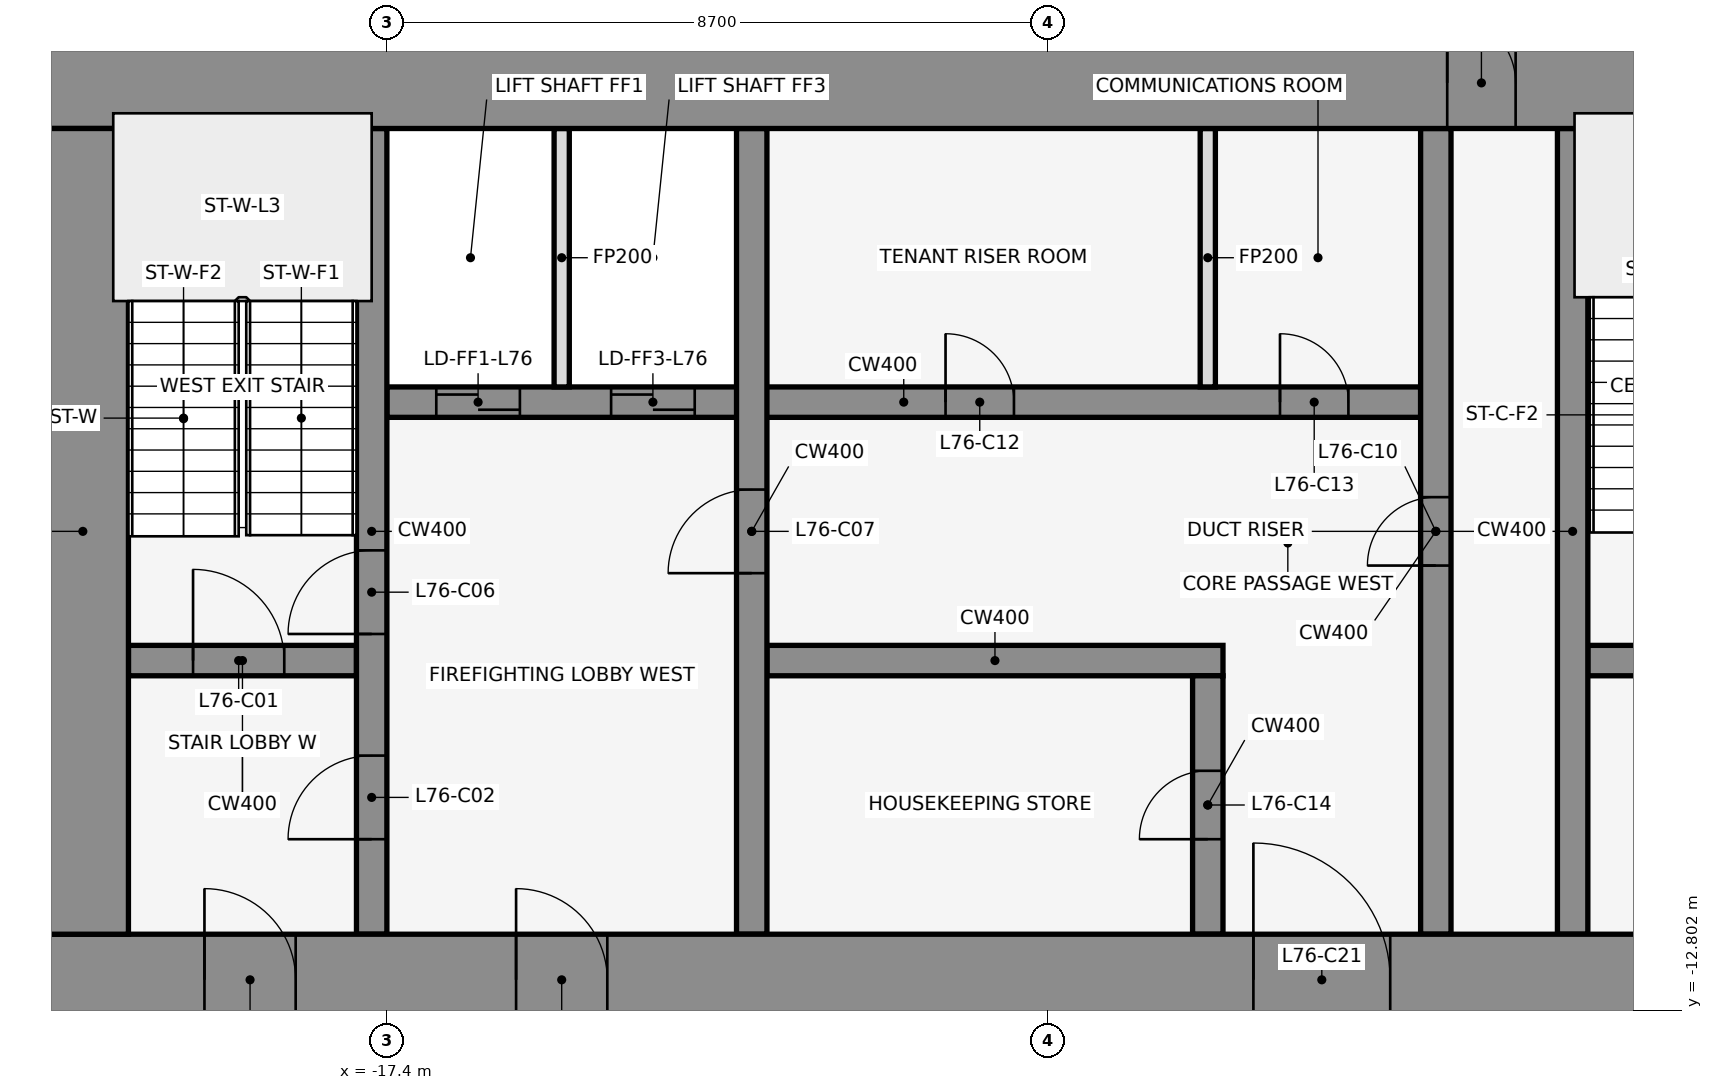
"""IFC4 building model, lengths in metres.
Left out: names, types, materials, properties, quantities, classifications, styles, units other than length and angle.
Written with IfcOpenShell. Run it as: python <this file> out.ifc"""

import sys

from ifc_helpers import new_model, si_unit, direction, frame, frame_2d, origin, place, context, subcontext, project, spatial, rectangle, extrude, element, fill, save


model = new_model("IFC4")
c1 = context("Model", 3, precision=1e-05, world=origin(), true_north=direction((0.0, 1.0)))
c2 = subcontext(c1, "Body", "Model", "MODEL_VIEW")
j1 = project(units=[si_unit("LENGTHUNIT", "METRE"), si_unit("PLANEANGLEUNIT", "RADIAN")], contexts=[c1])
p1 = place(None, origin())
s1 = spatial("IfcSite", under=j1, at=p1, CompositionType="ELEMENT")
p2 = place(p1, origin())
s2 = spatial("IfcBuilding", under=s1, at=p2, CompositionType="ELEMENT")
p3 = place(p2, frame((0.0, 0.0, 338.0)))
s3 = spatial("IfcBuildingStorey", under=s2, at=p3, CompositionType="ELEMENT", Elevation=338.0)
for number, where, z_axis, x_axis in (
    (1, (-0.068, -0.105, 0.0), (0.0, 0.0, 1.0), (-0.84, 0.543, 0.0)),
    (2, (-14.599, 1.08, 0.0), (0.0, 0.0, 1.0), (-0.84, -0.543, 0.0)),
):
    element("IfcWall", number, at=place(p3, frame(where, z_axis=z_axis, x_axis=x_axis)), inside=s3, PredefinedType="STANDARD", context=c2, shape_type="SweptSolid", body=[
        extrude(rectangle(XDim=2.183, YDim=0.25, at=frame_2d((1.091, 0.0))), origin(), (0.0, 0.0, 1.0), 4.3),
    ])
p4 = place(p3, frame((-20.8, -8.2, 0.0), z_axis=(0.0, 0.0, 1.0), x_axis=(1.0, 0.0, 0.0)))
e3 = element("IfcWall", 3, at=p4, inside=s3, PredefinedType="SHEAR", context=c2, shape_type="SweptSolid", body=[
    extrude(rectangle(XDim=3.0, YDim=0.4, at=frame_2d((1.5, 0.0))), origin(), (0.0, 0.0, 1.0), 4.5),
])
p5 = place(p4, frame((0.85, 0.0, 0.0)))
e4 = element("IfcOpeningElement", 4, at=p5, cuts=e3, PredefinedType="OPENING", context=c2, shape_type="SweptSolid", body=[
    extrude(rectangle(XDim=1.2, YDim=2.1, at=frame_2d((0.6, 1.05))), frame((0.0, 0.212, 0.0), z_axis=(0.0, -1.0, 0.0), x_axis=(1.0, 0.0, 0.0)), (0.0, 0.0, 1.0), 0.424),
])
p6 = place(p3, frame((-12.4, -8.2, 0.0), z_axis=(0.0, 0.0, 1.0), x_axis=(1.0, 0.0, 0.0)))
e5 = element("IfcWall", 5, at=p6, inside=s3, PredefinedType="SHEAR", context=c2, shape_type="SweptSolid", body=[
    extrude(rectangle(XDim=6.0, YDim=0.4, at=frame_2d((3.0, 0.0))), origin(), (0.0, 0.0, 1.0), 4.5),
])
p7 = place(p3, frame((-1.6, -8.2, 0.0), z_axis=(0.0, 0.0, 1.0), x_axis=(1.0, 0.0, 0.0)))
e6 = element("IfcWall", 6, at=p7, inside=s3, PredefinedType="SHEAR", context=c2, shape_type="SweptSolid", body=[
    extrude(rectangle(XDim=3.2, YDim=0.4, at=frame_2d((1.6, 0.0))), origin(), (0.0, 0.0, 1.0), 4.5),
])
p8 = place(p7, frame((1.05, 0.0, 0.0)))
e7 = element("IfcOpeningElement", 7, at=p8, cuts=e6, PredefinedType="OPENING", context=c2, shape_type="SweptSolid", body=[
    extrude(rectangle(XDim=1.2, YDim=2.1, at=frame_2d((0.6, 1.05))), frame((0.0, 0.212, 0.0), z_axis=(0.0, -1.0, 0.0), x_axis=(1.0, 0.0, 0.0)), (0.0, 0.0, 1.0), 0.424),
])
p9 = place(p3, frame((-17.4, -4.8, 0.0), z_axis=(0.0, 0.0, 1.0), x_axis=(1.0, 0.0, 0.0)))
e8 = element("IfcWall", 8, at=p9, inside=s3, PredefinedType="SHEAR", context=c2, shape_type="SweptSolid", body=[
    extrude(rectangle(XDim=13.6, YDim=0.4, at=frame_2d((6.8, 0.0))), origin(), (0.0, 0.0, 1.0), 4.5),
])
p10 = place(p9, frame((0.65, 0.0, 0.0)))
e9 = element("IfcOpeningElement", 9, at=p10, cuts=e8, PredefinedType="OPENING", context=c2, shape_type="SweptSolid", body=[
    extrude(rectangle(XDim=1.1, YDim=2.1, at=frame_2d((0.55, 1.05))), frame((0.0, 0.212, 0.0), z_axis=(0.0, -1.0, 0.0), x_axis=(1.0, 0.0, 0.0)), (0.0, 0.0, 1.0), 0.424),
])
p11 = place(p9, frame((2.95, 0.0, 0.0)))
e10 = element("IfcOpeningElement", 10, at=p11, cuts=e8, PredefinedType="OPENING", context=c2, shape_type="SweptSolid", body=[
    extrude(rectangle(XDim=1.1, YDim=2.1, at=frame_2d((0.55, 1.05))), frame((0.0, 0.212, 0.0), z_axis=(0.0, -1.0, 0.0), x_axis=(1.0, 0.0, 0.0)), (0.0, 0.0, 1.0), 0.424),
])
p12 = place(p9, frame((7.35, 0.0, 0.0)))
e11 = element("IfcOpeningElement", 11, at=p12, cuts=e8, PredefinedType="OPENING", context=c2, shape_type="SweptSolid", body=[
    extrude(rectangle(XDim=0.9, YDim=2.1, at=frame_2d((0.45, 1.05))), frame((0.0, 0.212, 0.0), z_axis=(0.0, -1.0, 0.0), x_axis=(1.0, 0.0, 0.0)), (0.0, 0.0, 1.0), 0.424),
])
p13 = place(p9, frame((11.75, 0.0, 0.0)))
e12 = element("IfcOpeningElement", 12, at=p13, cuts=e8, PredefinedType="OPENING", context=c2, shape_type="SweptSolid", body=[
    extrude(rectangle(XDim=0.9, YDim=2.1, at=frame_2d((0.45, 1.05))), frame((0.0, 0.212, 0.0), z_axis=(0.0, -1.0, 0.0), x_axis=(1.0, 0.0, 0.0)), (0.0, 0.0, 1.0), 0.424),
])
p14 = place(p3, frame((-17.6, -11.8, 0.0), z_axis=(0.0, 0.0, 1.0), x_axis=(0.0, 1.0, 0.0)))
e13 = element("IfcWall", 13, at=p14, inside=s3, PredefinedType="SHEAR", context=c2, shape_type="SweptSolid", body=[
    extrude(rectangle(XDim=10.6, YDim=0.4, at=frame_2d((5.3, 0.0))), origin(), (0.0, 0.0, 1.0), 4.5),
])
p15 = place(p14, frame((1.25, 0.0, 0.0)))
e14 = element("IfcOpeningElement", 14, at=p15, cuts=e13, PredefinedType="OPENING", context=c2, shape_type="SweptSolid", body=[
    extrude(rectangle(XDim=1.1, YDim=2.1, at=frame_2d((0.55, 1.05))), frame((0.0, 0.212, 0.0), z_axis=(0.0, -1.0, 0.0), x_axis=(1.0, 0.0, 0.0)), (0.0, 0.0, 1.0), 0.424),
])
p16 = place(p14, frame((3.95, 0.0, 0.0)))
e15 = element("IfcOpeningElement", 15, at=p16, cuts=e13, PredefinedType="OPENING", context=c2, shape_type="SweptSolid", body=[
    extrude(rectangle(XDim=1.1, YDim=2.1, at=frame_2d((0.55, 1.05))), frame((0.0, 0.212, 0.0), z_axis=(0.0, -1.0, 0.0), x_axis=(1.0, 0.0, 0.0)), (0.0, 0.0, 1.0), 0.424),
])
p17 = place(p3, frame((-15.1, -4.6, 0.0), z_axis=(0.0, 0.0, 1.0), x_axis=(0.0, 1.0, 0.0)))
e16 = element("IfcWall", 16, at=p17, inside=s3, PredefinedType="PARTITIONING", context=c2, shape_type="SweptSolid", body=[
    extrude(rectangle(XDim=3.4, YDim=0.2, at=frame_2d((1.7, 0.0))), origin(), (0.0, 0.0, 1.0), 3.368),
])
p18 = place(p3, frame((-12.6, -11.8, 0.0), z_axis=(0.0, 0.0, 1.0), x_axis=(0.0, 1.0, 0.0)))
e17 = element("IfcWall", 17, at=p18, inside=s3, PredefinedType="SHEAR", context=c2, shape_type="SweptSolid", body=[
    extrude(rectangle(XDim=10.6, YDim=0.4, at=frame_2d((5.3, 0.0))), origin(), (0.0, 0.0, 1.0), 4.5),
])
p19 = place(p18, frame((4.75, 0.0, 0.0)))
e18 = element("IfcOpeningElement", 18, at=p19, cuts=e17, PredefinedType="OPENING", context=c2, shape_type="SweptSolid", body=[
    extrude(rectangle(XDim=1.1, YDim=2.1, at=frame_2d((0.55, 1.05))), frame((0.0, 0.212, 0.0), z_axis=(0.0, -1.0, 0.0), x_axis=(1.0, 0.0, 0.0)), (0.0, 0.0, 1.0), 0.424),
])
p20 = place(p3, frame((-6.6, -11.8, 0.0), z_axis=(0.0, 0.0, 1.0), x_axis=(0.0, 1.0, 0.0)))
e19 = element("IfcWall", 19, at=p20, inside=s3, PredefinedType="SHEAR", context=c2, shape_type="SweptSolid", body=[
    extrude(rectangle(XDim=3.4, YDim=0.4, at=frame_2d((1.7, 0.0))), origin(), (0.0, 0.0, 1.0), 4.5),
])
p21 = place(p20, frame((1.25, 0.0, 0.0)))
e20 = element("IfcOpeningElement", 20, at=p21, cuts=e19, PredefinedType="OPENING", context=c2, shape_type="SweptSolid", body=[
    extrude(rectangle(XDim=0.9, YDim=2.1, at=frame_2d((0.45, 1.05))), frame((0.0, 0.212, 0.0), z_axis=(0.0, -1.0, 0.0), x_axis=(1.0, 0.0, 0.0)), (0.0, 0.0, 1.0), 0.424),
])
p22 = place(p3, frame((-6.6, -4.6, 0.0), z_axis=(0.0, 0.0, 1.0), x_axis=(0.0, 1.0, 0.0)))
e21 = element("IfcWall", 21, at=p22, inside=s3, PredefinedType="PARTITIONING", context=c2, shape_type="SweptSolid", body=[
    extrude(rectangle(XDim=3.4, YDim=0.2, at=frame_2d((1.7, 0.0))), origin(), (0.0, 0.0, 1.0), 3.368),
])
p23 = place(p3, frame((-3.6, -11.8, 0.0), z_axis=(0.0, 0.0, 1.0), x_axis=(0.0, 1.0, 0.0)))
e22 = element("IfcWall", 22, at=p23, inside=s3, PredefinedType="SHEAR", context=c2, shape_type="SweptSolid", body=[
    extrude(rectangle(XDim=10.6, YDim=0.4, at=frame_2d((5.3, 0.0))), origin(), (0.0, 0.0, 1.0), 4.5),
])
p24 = place(p23, frame((4.85, 0.0, 0.0)))
e23 = element("IfcOpeningElement", 23, at=p24, cuts=e22, PredefinedType="OPENING", context=c2, shape_type="SweptSolid", body=[
    extrude(rectangle(XDim=0.9, YDim=2.1, at=frame_2d((0.45, 1.05))), frame((0.0, 0.212, 0.0), z_axis=(0.0, -1.0, 0.0), x_axis=(1.0, 0.0, 0.0)), (0.0, 0.0, 1.0), 0.424),
])
p25 = place(p3, frame((-1.8, -11.8, 0.0), z_axis=(0.0, 0.0, 1.0), x_axis=(0.0, 1.0, 0.0)))
e24 = element("IfcWall", 24, at=p25, inside=s3, PredefinedType="SHEAR", context=c2, shape_type="SweptSolid", body=[
    extrude(rectangle(XDim=10.6, YDim=0.4, at=frame_2d((5.3, 0.0))), origin(), (0.0, 0.0, 1.0), 4.5),
])
p26 = place(p3, frame((-22.0, -0.6, 0.0), z_axis=(0.0, 0.0, 1.0), x_axis=(1.0, 0.0, 0.0)))
e25 = element("IfcWall", 25, at=p26, inside=s3, PredefinedType="SHEAR", context=c2, shape_type="SweptSolid", body=[
    extrude(rectangle(XDim=44.0, YDim=1.2, at=frame_2d((22.0, 0.0))), origin(), (0.0, 0.0, 1.0), 4.5),
])
p27 = place(p26, frame((18.55, 0.0, 0.0)))
e26 = element("IfcOpeningElement", 26, at=p27, cuts=e25, PredefinedType="OPENING", context=c2, shape_type="SweptSolid", body=[
    extrude(rectangle(XDim=0.9, YDim=2.1, at=frame_2d((0.45, 1.05))), frame((0.0, 0.612, 0.0), z_axis=(0.0, -1.0, 0.0), x_axis=(1.0, 0.0, 0.0)), (0.0, 0.0, 1.0), 1.224),
])
p28 = place(p26, frame((24.55, 0.0, 0.0)))
e27 = element("IfcOpeningElement", 27, at=p28, cuts=e25, PredefinedType="OPENING", context=c2, shape_type="SweptSolid", body=[
    extrude(rectangle(XDim=0.9, YDim=2.1, at=frame_2d((0.45, 1.05))), frame((0.0, 0.612, 0.0), z_axis=(0.0, -1.0, 0.0), x_axis=(1.0, 0.0, 0.0)), (0.0, 0.0, 1.0), 1.224),
])
p29 = place(p3, frame((-22.0, -12.4, 0.0), z_axis=(0.0, 0.0, 1.0), x_axis=(1.0, 0.0, 0.0)))
e28 = element("IfcWall", 28, at=p29, inside=s3, PredefinedType="SHEAR", context=c2, shape_type="SweptSolid", body=[
    extrude(rectangle(XDim=44.0, YDim=1.2, at=frame_2d((22.0, 0.0))), origin(), (0.0, 0.0, 1.0), 4.5),
])
p30 = place(p29, frame((2.2, 0.0, 0.0)))
e29 = element("IfcOpeningElement", 29, at=p30, cuts=e28, PredefinedType="OPENING", context=c2, shape_type="SweptSolid", body=[
    extrude(rectangle(XDim=1.2, YDim=2.1, at=frame_2d((0.6, 1.05))), frame((0.0, 0.612, 0.0), z_axis=(0.0, -1.0, 0.0), x_axis=(1.0, 0.0, 0.0)), (0.0, 0.0, 1.0), 1.224),
])
p31 = place(p29, frame((21.4, 0.0, 0.0)))
e30 = element("IfcOpeningElement", 30, at=p31, cuts=e28, PredefinedType="OPENING", context=c2, shape_type="SweptSolid", body=[
    extrude(rectangle(XDim=1.2, YDim=2.1, at=frame_2d((0.6, 1.05))), frame((0.0, 0.612, 0.0), z_axis=(0.0, -1.0, 0.0), x_axis=(1.0, 0.0, 0.0)), (0.0, 0.0, 1.0), 1.224),
])
p32 = place(p29, frame((40.6, 0.0, 0.0)))
e31 = element("IfcOpeningElement", 31, at=p32, cuts=e28, PredefinedType="OPENING", context=c2, shape_type="SweptSolid", body=[
    extrude(rectangle(XDim=1.2, YDim=2.1, at=frame_2d((0.6, 1.05))), frame((0.0, 0.612, 0.0), z_axis=(0.0, -1.0, 0.0), x_axis=(1.0, 0.0, 0.0)), (0.0, 0.0, 1.0), 1.224),
])
p33 = place(p29, frame((16.0, 0.0, 0.0)))
e32 = element("IfcOpeningElement", 32, at=p33, cuts=e28, PredefinedType="OPENING", context=c2, shape_type="SweptSolid", body=[
    extrude(rectangle(XDim=1.8, YDim=2.1, at=frame_2d((0.9, 1.05))), frame((0.0, 0.612, 0.0), z_axis=(0.0, -1.0, 0.0), x_axis=(1.0, 0.0, 0.0)), (0.0, 0.0, 1.0), 1.224),
])
p34 = place(p29, frame((6.3, 0.0, 0.0)))
e33 = element("IfcOpeningElement", 33, at=p34, cuts=e28, PredefinedType="OPENING", context=c2, shape_type="SweptSolid", body=[
    extrude(rectangle(XDim=1.2, YDim=2.1, at=frame_2d((0.6, 1.05))), frame((0.0, 0.612, 0.0), z_axis=(0.0, -1.0, 0.0), x_axis=(1.0, 0.0, 0.0)), (0.0, 0.0, 1.0), 1.224),
])
p35 = place(p29, frame((26.2, 0.0, 0.0)))
e34 = element("IfcOpeningElement", 34, at=p35, cuts=e28, PredefinedType="OPENING", context=c2, shape_type="SweptSolid", body=[
    extrude(rectangle(XDim=1.8, YDim=2.1, at=frame_2d((0.9, 1.05))), frame((0.0, 0.612, 0.0), z_axis=(0.0, -1.0, 0.0), x_axis=(1.0, 0.0, 0.0)), (0.0, 0.0, 1.0), 1.224),
])
p36 = place(p29, frame((36.5, 0.0, 0.0)))
e35 = element("IfcOpeningElement", 35, at=p36, cuts=e28, PredefinedType="OPENING", context=c2, shape_type="SweptSolid", body=[
    extrude(rectangle(XDim=1.2, YDim=2.1, at=frame_2d((0.6, 1.05))), frame((0.0, 0.612, 0.0), z_axis=(0.0, -1.0, 0.0), x_axis=(1.0, 0.0, 0.0)), (0.0, 0.0, 1.0), 1.224),
])
p37 = place(p3, frame((-21.4, -11.8, 0.0), z_axis=(0.0, 0.0, 1.0), x_axis=(0.0, 1.0, 0.0)))
e36 = element("IfcWall", 36, at=p37, inside=s3, PredefinedType="SHEAR", context=c2, shape_type="SweptSolid", body=[
    extrude(rectangle(XDim=10.6, YDim=1.2, at=frame_2d((5.3, 0.0))), origin(), (0.0, 0.0, 1.0), 4.5),
])
p38 = place(p5, origin())
e37 = element("IfcDoor", 37, at=p38, inside=s3, OperationType="SINGLE_SWING_LEFT", PredefinedType="DOOR", context=c2, shape_type="SweptSolid", body=[
    extrude(rectangle(XDim=1.2, YDim=2.1, at=frame_2d((0.6, 1.05))), frame((0.0, 0.025, 0.0), z_axis=(0.0, -1.0, 0.0), x_axis=(1.0, 0.0, 0.0)), (0.0, 0.0, 1.0), 0.05),
])
fill(e4, e37)
p39 = place(p15, frame((1.1, 0.0, 0.0), z_axis=(0.0, 0.0, 1.0), x_axis=(-1.0, 0.0, 0.0)))
e38 = element("IfcDoor", 38, at=p39, inside=s3, OperationType="SINGLE_SWING_LEFT", PredefinedType="DOOR", context=c2, shape_type="SweptSolid", body=[
    extrude(rectangle(XDim=1.1, YDim=2.1, at=frame_2d((0.55, 1.05))), frame((0.0, 0.025, 0.0), z_axis=(0.0, -1.0, 0.0), x_axis=(1.0, 0.0, 0.0)), (0.0, 0.0, 1.0), 0.05),
])
fill(e14, e38)
p40 = place(p10, origin())
e39 = element("IfcDoor", 39, at=p40, inside=s3, OperationType="DOUBLE_DOOR_SLIDING", PredefinedType="DOOR", context=c2, shape_type="SweptSolid", body=[
    extrude(rectangle(XDim=1.1, YDim=2.1, at=frame_2d((0.55, 1.05))), frame((0.0, 0.025, 0.0), z_axis=(0.0, -1.0, 0.0), x_axis=(1.0, 0.0, 0.0)), (0.0, 0.0, 1.0), 0.05),
])
fill(e9, e39)
p41 = place(p11, origin())
e40 = element("IfcDoor", 40, at=p41, inside=s3, OperationType="DOUBLE_DOOR_SLIDING", PredefinedType="DOOR", context=c2, shape_type="SweptSolid", body=[
    extrude(rectangle(XDim=1.1, YDim=2.1, at=frame_2d((0.55, 1.05))), frame((0.0, 0.025, 0.0), z_axis=(0.0, -1.0, 0.0), x_axis=(1.0, 0.0, 0.0)), (0.0, 0.0, 1.0), 0.05),
])
fill(e10, e40)
p42 = place(p16, frame((1.1, 0.0, 0.0), z_axis=(0.0, 0.0, 1.0), x_axis=(-1.0, 0.0, 0.0)))
e41 = element("IfcDoor", 41, at=p42, inside=s3, OperationType="SINGLE_SWING_LEFT", PredefinedType="DOOR", context=c2, shape_type="SweptSolid", body=[
    extrude(rectangle(XDim=1.1, YDim=2.1, at=frame_2d((0.55, 1.05))), frame((0.0, 0.025, 0.0), z_axis=(0.0, -1.0, 0.0), x_axis=(1.0, 0.0, 0.0)), (0.0, 0.0, 1.0), 0.05),
])
fill(e15, e41)
p43 = place(p19, origin())
e42 = element("IfcDoor", 42, at=p43, inside=s3, OperationType="SINGLE_SWING_LEFT", PredefinedType="DOOR", context=c2, shape_type="SweptSolid", body=[
    extrude(rectangle(XDim=1.1, YDim=2.1, at=frame_2d((0.55, 1.05))), frame((0.0, 0.025, 0.0), z_axis=(0.0, -1.0, 0.0), x_axis=(1.0, 0.0, 0.0)), (0.0, 0.0, 1.0), 0.05),
])
fill(e18, e42)
p44 = place(p24, frame((0.9, 0.0, 0.0), z_axis=(0.0, 0.0, 1.0), x_axis=(-1.0, 0.0, 0.0)))
e43 = element("IfcDoor", 43, at=p44, inside=s3, OperationType="SINGLE_SWING_LEFT", PredefinedType="DOOR", context=c2, shape_type="SweptSolid", body=[
    extrude(rectangle(XDim=0.9, YDim=2.1, at=frame_2d((0.45, 1.05))), frame((0.0, 0.025, 0.0), z_axis=(0.0, -1.0, 0.0), x_axis=(1.0, 0.0, 0.0)), (0.0, 0.0, 1.0), 0.05),
])
fill(e23, e43)
p45 = place(p12, origin())
e44 = element("IfcDoor", 44, at=p45, inside=s3, OperationType="SINGLE_SWING_RIGHT", PredefinedType="DOOR", context=c2, shape_type="SweptSolid", body=[
    extrude(rectangle(XDim=0.9, YDim=2.1, at=frame_2d((0.45, 1.05))), frame((0.0, 0.025, 0.0), z_axis=(0.0, -1.0, 0.0), x_axis=(1.0, 0.0, 0.0)), (0.0, 0.0, 1.0), 0.05),
])
fill(e11, e44)
p46 = place(p13, origin())
e45 = element("IfcDoor", 45, at=p46, inside=s3, OperationType="SINGLE_SWING_LEFT", PredefinedType="DOOR", context=c2, shape_type="SweptSolid", body=[
    extrude(rectangle(XDim=0.9, YDim=2.1, at=frame_2d((0.45, 1.05))), frame((0.0, 0.025, 0.0), z_axis=(0.0, -1.0, 0.0), x_axis=(1.0, 0.0, 0.0)), (0.0, 0.0, 1.0), 0.05),
])
fill(e12, e45)
p47 = place(p21, origin())
e46 = element("IfcDoor", 46, at=p47, inside=s3, OperationType="SINGLE_SWING_RIGHT", PredefinedType="DOOR", context=c2, shape_type="SweptSolid", body=[
    extrude(rectangle(XDim=0.9, YDim=2.1, at=frame_2d((0.45, 1.05))), frame((0.0, 0.025, 0.0), z_axis=(0.0, -1.0, 0.0), x_axis=(1.0, 0.0, 0.0)), (0.0, 0.0, 1.0), 0.05),
])
fill(e20, e46)
p48 = place(p27, origin())
e47 = element("IfcDoor", 47, at=p48, inside=s3, OperationType="SINGLE_SWING_LEFT", PredefinedType="DOOR", context=c2, shape_type="SweptSolid", body=[
    extrude(rectangle(XDim=0.9, YDim=2.1, at=frame_2d((0.45, 1.05))), frame((0.0, 0.025, 0.0), z_axis=(0.0, -1.0, 0.0), x_axis=(1.0, 0.0, 0.0)), (0.0, 0.0, 1.0), 0.05),
])
fill(e26, e47)
p49 = place(p30, frame((1.2, 0.0, 0.0), z_axis=(0.0, 0.0, 1.0), x_axis=(-1.0, 0.0, 0.0)))
e48 = element("IfcDoor", 48, at=p49, inside=s3, OperationType="SINGLE_SWING_RIGHT", PredefinedType="DOOR", context=c2, shape_type="SweptSolid", body=[
    extrude(rectangle(XDim=1.2, YDim=2.1, at=frame_2d((0.6, 1.05))), frame((0.0, 0.025, 0.0), z_axis=(0.0, -1.0, 0.0), x_axis=(1.0, 0.0, 0.0)), (0.0, 0.0, 1.0), 0.05),
])
fill(e29, e48)
p50 = place(p33, origin())
e49 = element("IfcDoor", 49, at=p50, inside=s3, OperationType="SINGLE_SWING_LEFT", PredefinedType="DOOR", context=c2, shape_type="SweptSolid", body=[
    extrude(rectangle(XDim=1.8, YDim=2.1, at=frame_2d((0.9, 1.05))), frame((0.0, 0.025, 0.0), z_axis=(0.0, -1.0, 0.0), x_axis=(1.0, 0.0, 0.0)), (0.0, 0.0, 1.0), 0.05),
])
fill(e32, e49)
p51 = place(p34, frame((1.2, 0.0, 0.0), z_axis=(0.0, 0.0, 1.0), x_axis=(-1.0, 0.0, 0.0)))
e50 = element("IfcDoor", 50, at=p51, inside=s3, OperationType="SINGLE_SWING_RIGHT", PredefinedType="DOOR", context=c2, shape_type="SweptSolid", body=[
    extrude(rectangle(XDim=1.2, YDim=2.1, at=frame_2d((0.6, 1.05))), frame((0.0, 0.025, 0.0), z_axis=(0.0, -1.0, 0.0), x_axis=(1.0, 0.0, 0.0)), (0.0, 0.0, 1.0), 0.05),
])
fill(e33, e50)
save(model, sys.argv[1])
